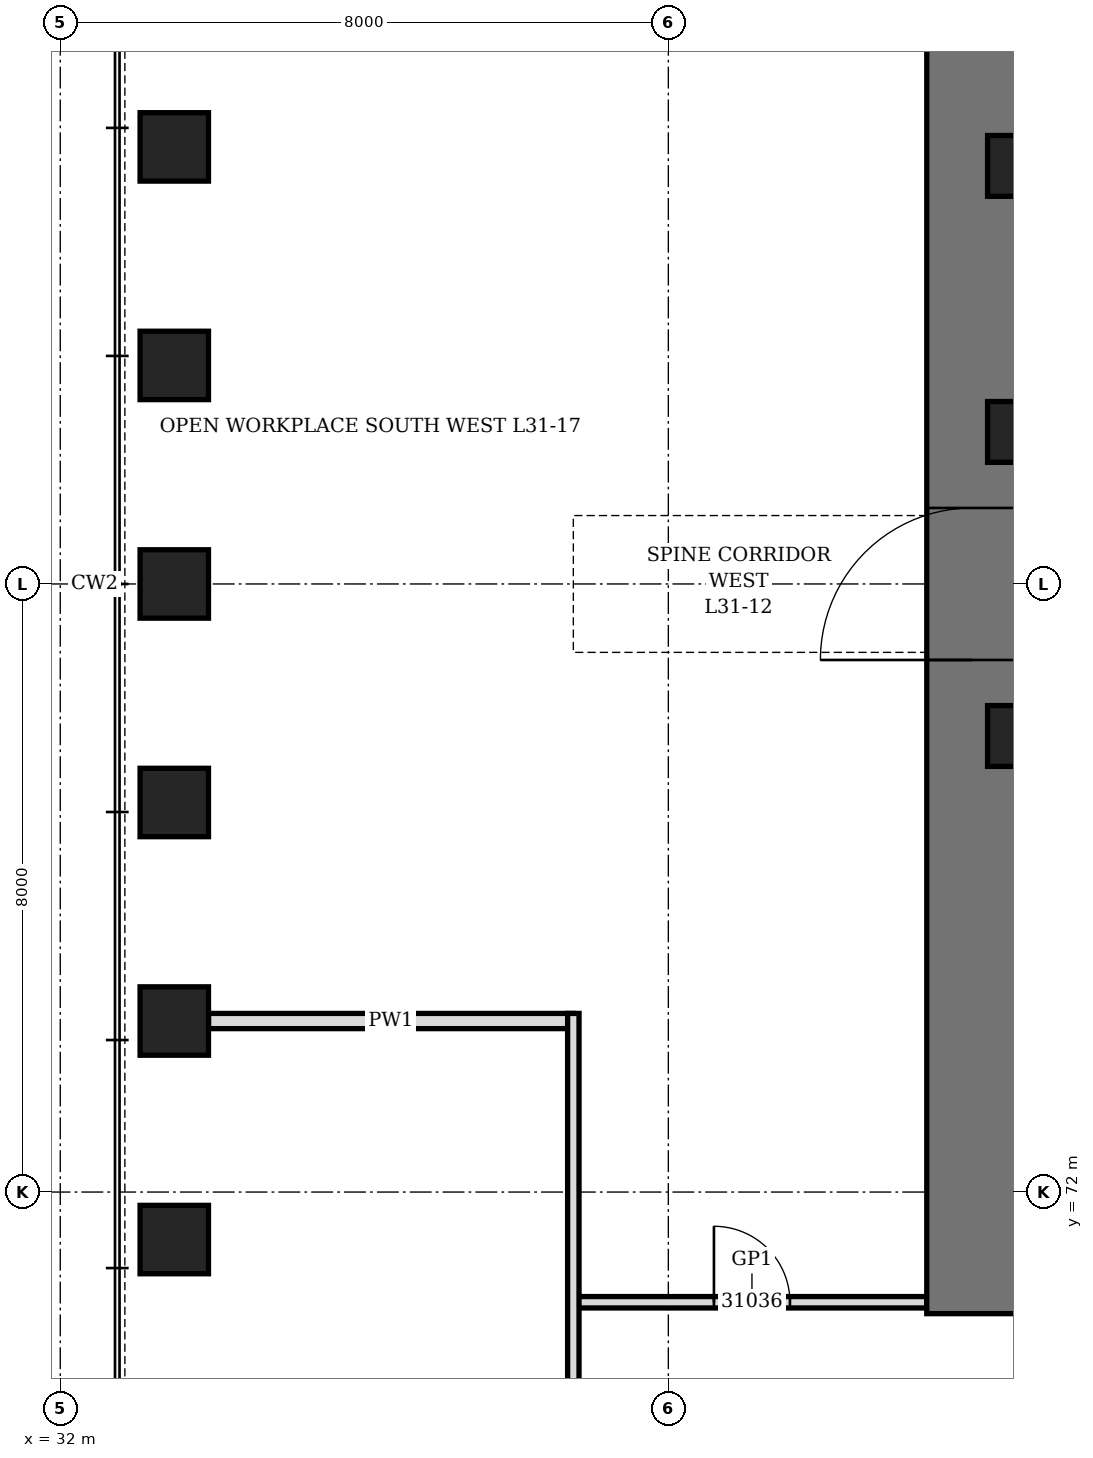
"""IFC4 building model, lengths in metres.
Left out: names, types, materials, properties, quantities, classifications, styles, units other than length and angle.
Written with IfcOpenShell. Run it as: python <this file> out.ifc"""

import sys

from ifc_helpers import new_model, si_unit, direction, frame, frame_2d, origin, origin_2d, place, context, subcontext, project, spatial, rectangle, hollow_rectangle, extrude, element, fill, save


model = new_model("IFC4")
c1 = context("Model", 3, precision=1e-05, world=origin(), true_north=direction((0.0, 1.0)))
c2 = subcontext(c1, "Body", "Model", "MODEL_VIEW")
j1 = project(units=[si_unit("LENGTHUNIT", "METRE"), si_unit("PLANEANGLEUNIT", "RADIAN")], contexts=[c1])
p1 = place(None, origin())
s1 = spatial("IfcSite", under=j1, at=p1, CompositionType="ELEMENT")
p2 = place(p1, origin())
s2 = spatial("IfcBuilding", under=s1, at=p2, CompositionType="ELEMENT")
p3 = place(p2, frame((0.0, 0.0, 141.7)))
s3 = spatial("IfcBuildingStorey", under=s2, at=p3, CompositionType="ELEMENT", Elevation=141.7)
for number, where, z_axis, x_axis in (
    (1, (33.5, 85.75, 0.0), (0.0, 0.0, 1.0), (0.0, 1.0, 0.0)),
    (2, (33.5, 82.875, 0.0), (0.0, 0.0, 1.0), (0.0, 1.0, 0.0)),
    (3, (33.5, 80.0, 0.0), (0.0, 0.0, 1.0), (0.0, 1.0, 0.0)),
    (4, (33.5, 77.125, 0.0), (0.0, 0.0, 1.0), (0.0, 1.0, 0.0)),
    (5, (33.5, 74.25, 0.0), (0.0, 0.0, 1.0), (0.0, 1.0, 0.0)),
    (6, (33.5, 71.375, 0.0), (0.0, 0.0, 1.0), (0.0, 1.0, 0.0)),
):
    element("IfcColumn", number, at=place(p3, frame(where, z_axis=z_axis, x_axis=x_axis)), inside=s3, PredefinedType="COLUMN", context=c2, shape_type="SweptSolid", body=[
        extrude(hollow_rectangle(XDim=0.9, YDim=0.9, WallThickness=0.12, at=origin_2d()), origin(), (0.0, 0.0, 1.0), 4.2),
    ])
p4 = place(p3, frame((44.0, 70.4, 0.0), z_axis=(0.0, 0.0, 1.0), x_axis=(0.0, 1.0, 0.0)))
e7 = element("IfcWall", 7, at=p4, inside=s3, PredefinedType="SHEAR", context=c2, shape_type="SweptSolid", body=[
    extrude(rectangle(XDim=19.2, YDim=1.2, at=frame_2d((9.6, 0.0))), origin(), (0.0, 0.0, 1.0), 4.2),
])
p5 = place(p4, frame((8.6, 0.0, 0.0)))
e8 = element("IfcOpeningElement", 8, at=p5, cuts=e7, PredefinedType="OPENING", context=c2, shape_type="SweptSolid", body=[
    extrude(rectangle(XDim=2.0, YDim=2.4, at=frame_2d((1.0, 1.2))), frame((0.0, 0.61, 0.0), z_axis=(0.0, -1.0, 0.0), x_axis=(1.0, 0.0, 0.0)), (0.0, 0.0, 1.0), 1.22),
])
for number, where, z_axis, x_axis in (
    (9, (44.6, 78.0, 0.0), (0.0, 0.0, 1.0), (1.0, 0.0, 0.0)),
    (10, (44.6, 82.0, 0.0), (0.0, 0.0, 1.0), (1.0, 0.0, 0.0)),
    (11, (44.6, 85.5, 0.0), (0.0, 0.0, 1.0), (1.0, 0.0, 0.0)),
):
    element("IfcColumn", number, at=place(p3, frame(where, z_axis=z_axis, x_axis=x_axis)), inside=s3, PredefinedType="COLUMN", context=c2, shape_type="SweptSolid", body=[
        extrude(hollow_rectangle(XDim=0.8, YDim=0.8, WallThickness=0.1, at=origin_2d()), origin(), (0.0, 0.0, 1.0), 4.2),
    ])
p6 = place(p3, frame((33.95, 74.25, 0.0), z_axis=(0.0, 0.0, 1.0), x_axis=(1.0, 0.0, 0.0)))
e12 = element("IfcWall", 12, at=p6, inside=s3, PredefinedType="PARTITIONING", context=c2, shape_type="SweptSolid", body=[
    extrude(rectangle(XDim=4.8, YDim=0.2, at=frame_2d((2.4, 0.0))), origin(), (0.0, 0.0, 1.0), 3.428),
])
p7 = place(p3, frame((38.8, 70.55, 0.0), z_axis=(0.0, 0.0, 1.0), x_axis=(1.0, 0.0, 0.0)))
e13 = element("IfcWall", 13, at=p7, inside=s3, PredefinedType="PARTITIONING", context=c2, shape_type="SweptSolid", body=[
    extrude(rectangle(XDim=4.6, YDim=0.15, at=frame_2d((2.3, 0.0))), origin(), (0.0, 0.0, 1.0), 4.04),
])
p8 = place(p7, frame((1.8, 0.0, 0.0)))
e14 = element("IfcOpeningElement", 14, at=p8, cuts=e13, PredefinedType="OPENING", context=c2, shape_type="SweptSolid", body=[
    extrude(rectangle(XDim=1.0, YDim=2.4, at=frame_2d((0.5, 1.2))), frame((0.0, 0.085, 0.0), z_axis=(0.0, -1.0, 0.0), x_axis=(1.0, 0.0, 0.0)), (0.0, 0.0, 1.0), 0.17),
])
p9 = place(p3, frame((38.75, 63.2, 0.0), z_axis=(0.0, 0.0, 1.0), x_axis=(0.0, 1.0, 0.0)))
e15 = element("IfcWall", 15, at=p9, inside=s3, PredefinedType="PARTITIONING", context=c2, shape_type="SweptSolid", body=[
    extrude(rectangle(XDim=11.15, YDim=0.15, at=frame_2d((5.575, 0.0))), origin(), (0.0, 0.0, 1.0), 4.04),
])
p10 = place(p9, frame((3.363, 0.0, 0.0)))
e16 = element("IfcOpeningElement", 16, at=p10, cuts=e15, PredefinedType="OPENING", context=c2, shape_type="SweptSolid", body=[
    extrude(rectangle(XDim=1.0, YDim=2.4, at=frame_2d((0.5, 1.2))), frame((0.0, 0.085, 0.0), z_axis=(0.0, -1.0, 0.0), x_axis=(1.0, 0.0, 0.0)), (0.0, 0.0, 1.0), 0.17),
])
p11 = place(p5, origin())
e17 = element("IfcDoor", 17, at=p11, inside=s3, OperationType="DOUBLE_DOOR_SINGLE_SWING", PredefinedType="DOOR", context=c2, shape_type="SweptSolid", body=[
    extrude(rectangle(XDim=2.0, YDim=2.4, at=frame_2d((1.0, 1.2))), frame((0.0, 0.35, 0.0), z_axis=(0.0, -1.0, 0.0), x_axis=(1.0, 0.0, 0.0)), (0.0, 0.0, 1.0), 0.7),
])
fill(e8, e17)
p12 = place(p8, origin())
e18 = element("IfcDoor", 18, at=p12, inside=s3, OperationType="SINGLE_SWING_RIGHT", PredefinedType="DOOR", context=c2, shape_type="SweptSolid", body=[
    extrude(rectangle(XDim=1.0, YDim=2.4, at=frame_2d((0.5, 1.2))), frame((0.0, 0.075, 0.0), z_axis=(0.0, -1.0, 0.0), x_axis=(1.0, 0.0, 0.0)), (0.0, 0.0, 1.0), 0.149),
])
fill(e14, e18)
save(model, sys.argv[1])
